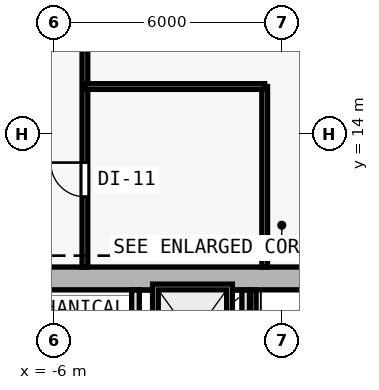
"""IFC4 building model, lengths in metres.
Left out: names, types, materials, properties, quantities, classifications, styles, units other than length and angle.
Written with IfcOpenShell. Run it as: python <this file> out.ifc"""

import sys

from ifc_helpers import new_model, si_unit, direction, frame, frame_2d, origin, place, context, subcontext, project, spatial, rectangle, extrude, element, fill, save


model = new_model("IFC4")
c1 = context("Model", 3, precision=1e-05, world=origin(), true_north=direction((0.0, 1.0)))
c2 = subcontext(c1, "Body", "Model", "MODEL_VIEW")
j1 = project(units=[si_unit("LENGTHUNIT", "METRE"), si_unit("PLANEANGLEUNIT", "RADIAN")], contexts=[c1])
p1 = place(None, origin())
s1 = spatial("IfcSite", under=j1, at=p1, CompositionType="ELEMENT")
p2 = place(p1, origin())
s2 = spatial("IfcBuilding", under=s1, at=p2, CompositionType="ELEMENT")
p3 = place(p2, frame((0.0, 0.0, 5.0)))
s3 = spatial("IfcBuildingStorey", under=s2, at=p3, CompositionType="ELEMENT", Elevation=5.0)
p4 = place(p3, frame((8.0, 10.2, 0.0), z_axis=(0.0, 0.0, 1.0), x_axis=(-1.0, 0.0, 0.0)))
e1 = element("IfcWall", 1, at=p4, inside=s3, PredefinedType="SHEAR", context=c2, shape_type="SweptSolid", body=[
    extrude(rectangle(XDim=16.0, YDim=0.6, at=frame_2d((8.0, 0.0))), origin(), (0.0, 0.0, 1.0), 3.92),
])
p5 = place(p4, frame((4.45, 0.0, 0.0)))
e2 = element("IfcOpeningElement", 2, at=p5, cuts=e1, PredefinedType="OPENING", context=c2, shape_type="SweptSolid", body=[
    extrude(rectangle(XDim=1.1, YDim=2.15, at=frame_2d((0.55, 1.075))), frame((0.0, 0.31, 0.0), z_axis=(0.0, -1.0, 0.0), x_axis=(1.0, 0.0, 0.0)), (0.0, 0.0, 1.0), 0.62),
])
p6 = place(p3, frame((-3.85, 1.35, 0.0), z_axis=(0.0, 0.0, 1.0), x_axis=(0.0, 1.0, 0.0)))
e3 = element("IfcWall", 3, at=p6, inside=s3, PredefinedType="SOLIDWALL", context=c2, shape_type="SweptSolid", body=[
    extrude(rectangle(XDim=8.545, YDim=0.2, at=frame_2d((4.272, 0.0))), origin(), (0.0, 0.0, 1.0), 3.92),
])
p7 = place(p6, frame((1.5, 0.0, 0.0)))
e4 = element("IfcOpeningElement", 4, at=p7, cuts=e3, PredefinedType="OPENING", context=c2, shape_type="SweptSolid", body=[
    extrude(rectangle(XDim=1.0, YDim=2.15, at=frame_2d((0.5, 1.075))), frame((0.0, 0.11, 0.0), z_axis=(0.0, -1.0, 0.0), x_axis=(1.0, 0.0, 0.0)), (0.0, 0.0, 1.0), 0.22),
])
p8 = place(p6, frame((3.18, 0.0, 0.0)))
e5 = element("IfcOpeningElement", 5, at=p8, cuts=e3, PredefinedType="OPENING", context=c2, shape_type="SweptSolid", body=[
    extrude(rectangle(XDim=1.0, YDim=2.15, at=frame_2d((0.5, 1.075))), frame((0.0, 0.11, 0.0), z_axis=(0.0, -1.0, 0.0), x_axis=(1.0, 0.0, 0.0)), (0.0, 0.0, 1.0), 0.22),
])
p9 = place(p3, frame((-0.95, 7.38, 0.0), z_axis=(0.0, 0.0, 1.0), x_axis=(0.0, 1.0, 0.0)))
e6 = element("IfcWall", 6, at=p9, inside=s3, PredefinedType="SOLIDWALL", context=c2, shape_type="SweptSolid", body=[
    extrude(rectangle(XDim=2.515, YDim=0.2, at=frame_2d((1.258, 0.0))), origin(), (0.0, 0.0, 1.0), 3.92),
])
p10 = place(p3, frame((-0.75, 5.92, 0.0), z_axis=(0.0, 0.0, 1.0), x_axis=(0.0, 1.0, 0.0)))
e7 = element("IfcWall", 7, at=p10, inside=s3, PredefinedType="PARTITIONING", context=c2, shape_type="SweptSolid", body=[
    extrude(rectangle(XDim=3.975, YDim=0.15, at=frame_2d((1.988, 0.0))), origin(), (0.0, 0.0, 1.0), 3.92),
])
p11 = place(p3, frame((-5.18, 10.5, 0.0), z_axis=(0.0, 0.0, 1.0), x_axis=(0.0, 1.0, 0.0)))
e8 = element("IfcWall", 8, at=p11, inside=s3, PredefinedType="PARTITIONING", context=c2, shape_type="SweptSolid", body=[
    extrude(rectangle(XDim=7.78, YDim=0.15, at=frame_2d((3.89, 0.0))), origin(), (0.0, 0.0, 1.0), 3.92),
])
p12 = place(p11, frame((1.849, 0.0, 0.0)))
e9 = element("IfcOpeningElement", 9, at=p12, cuts=e8, PredefinedType="OPENING", context=c2, shape_type="SweptSolid", body=[
    extrude(rectangle(XDim=0.9, YDim=2.1, at=frame_2d((0.45, 1.05))), frame((0.0, 0.085, 0.0), z_axis=(0.0, -1.0, 0.0), x_axis=(1.0, 0.0, 0.0)), (0.0, 0.0, 1.0), 0.17),
])
p13 = place(p3, frame((-0.45, 10.5, 0.0), z_axis=(0.0, 0.0, 1.0), x_axis=(0.0, 1.0, 0.0)))
e10 = element("IfcWall", 10, at=p13, inside=s3, PredefinedType="PARTITIONING", context=c2, shape_type="SweptSolid", body=[
    extrude(rectangle(XDim=4.75, YDim=0.15, at=frame_2d((2.375, 0.0))), origin(), (0.0, 0.0, 1.0), 3.92),
])
p14 = place(p3, frame((-5.18, 15.25, 0.0), z_axis=(0.0, 0.0, 1.0), x_axis=(1.0, 0.0, 0.0)))
e11 = element("IfcWall", 11, at=p14, inside=s3, PredefinedType="PARTITIONING", context=c2, shape_type="SweptSolid", body=[
    extrude(rectangle(XDim=4.73, YDim=0.15, at=frame_2d((2.365, 0.0))), origin(), (0.0, 0.0, 1.0), 3.92),
])
p15 = place(p12, origin())
e12 = element("IfcDoor", 12, at=p15, inside=s3, OperationType="SINGLE_SWING_RIGHT", PredefinedType="DOOR", context=c2, shape_type="SweptSolid", body=[
    extrude(rectangle(XDim=0.9, YDim=2.1, at=frame_2d((0.45, 1.05))), frame((0.0, 0.025, 0.0), z_axis=(0.0, -1.0, 0.0), x_axis=(1.0, 0.0, 0.0)), (0.0, 0.0, 1.0), 0.05),
])
fill(e9, e12)
save(model, sys.argv[1])
